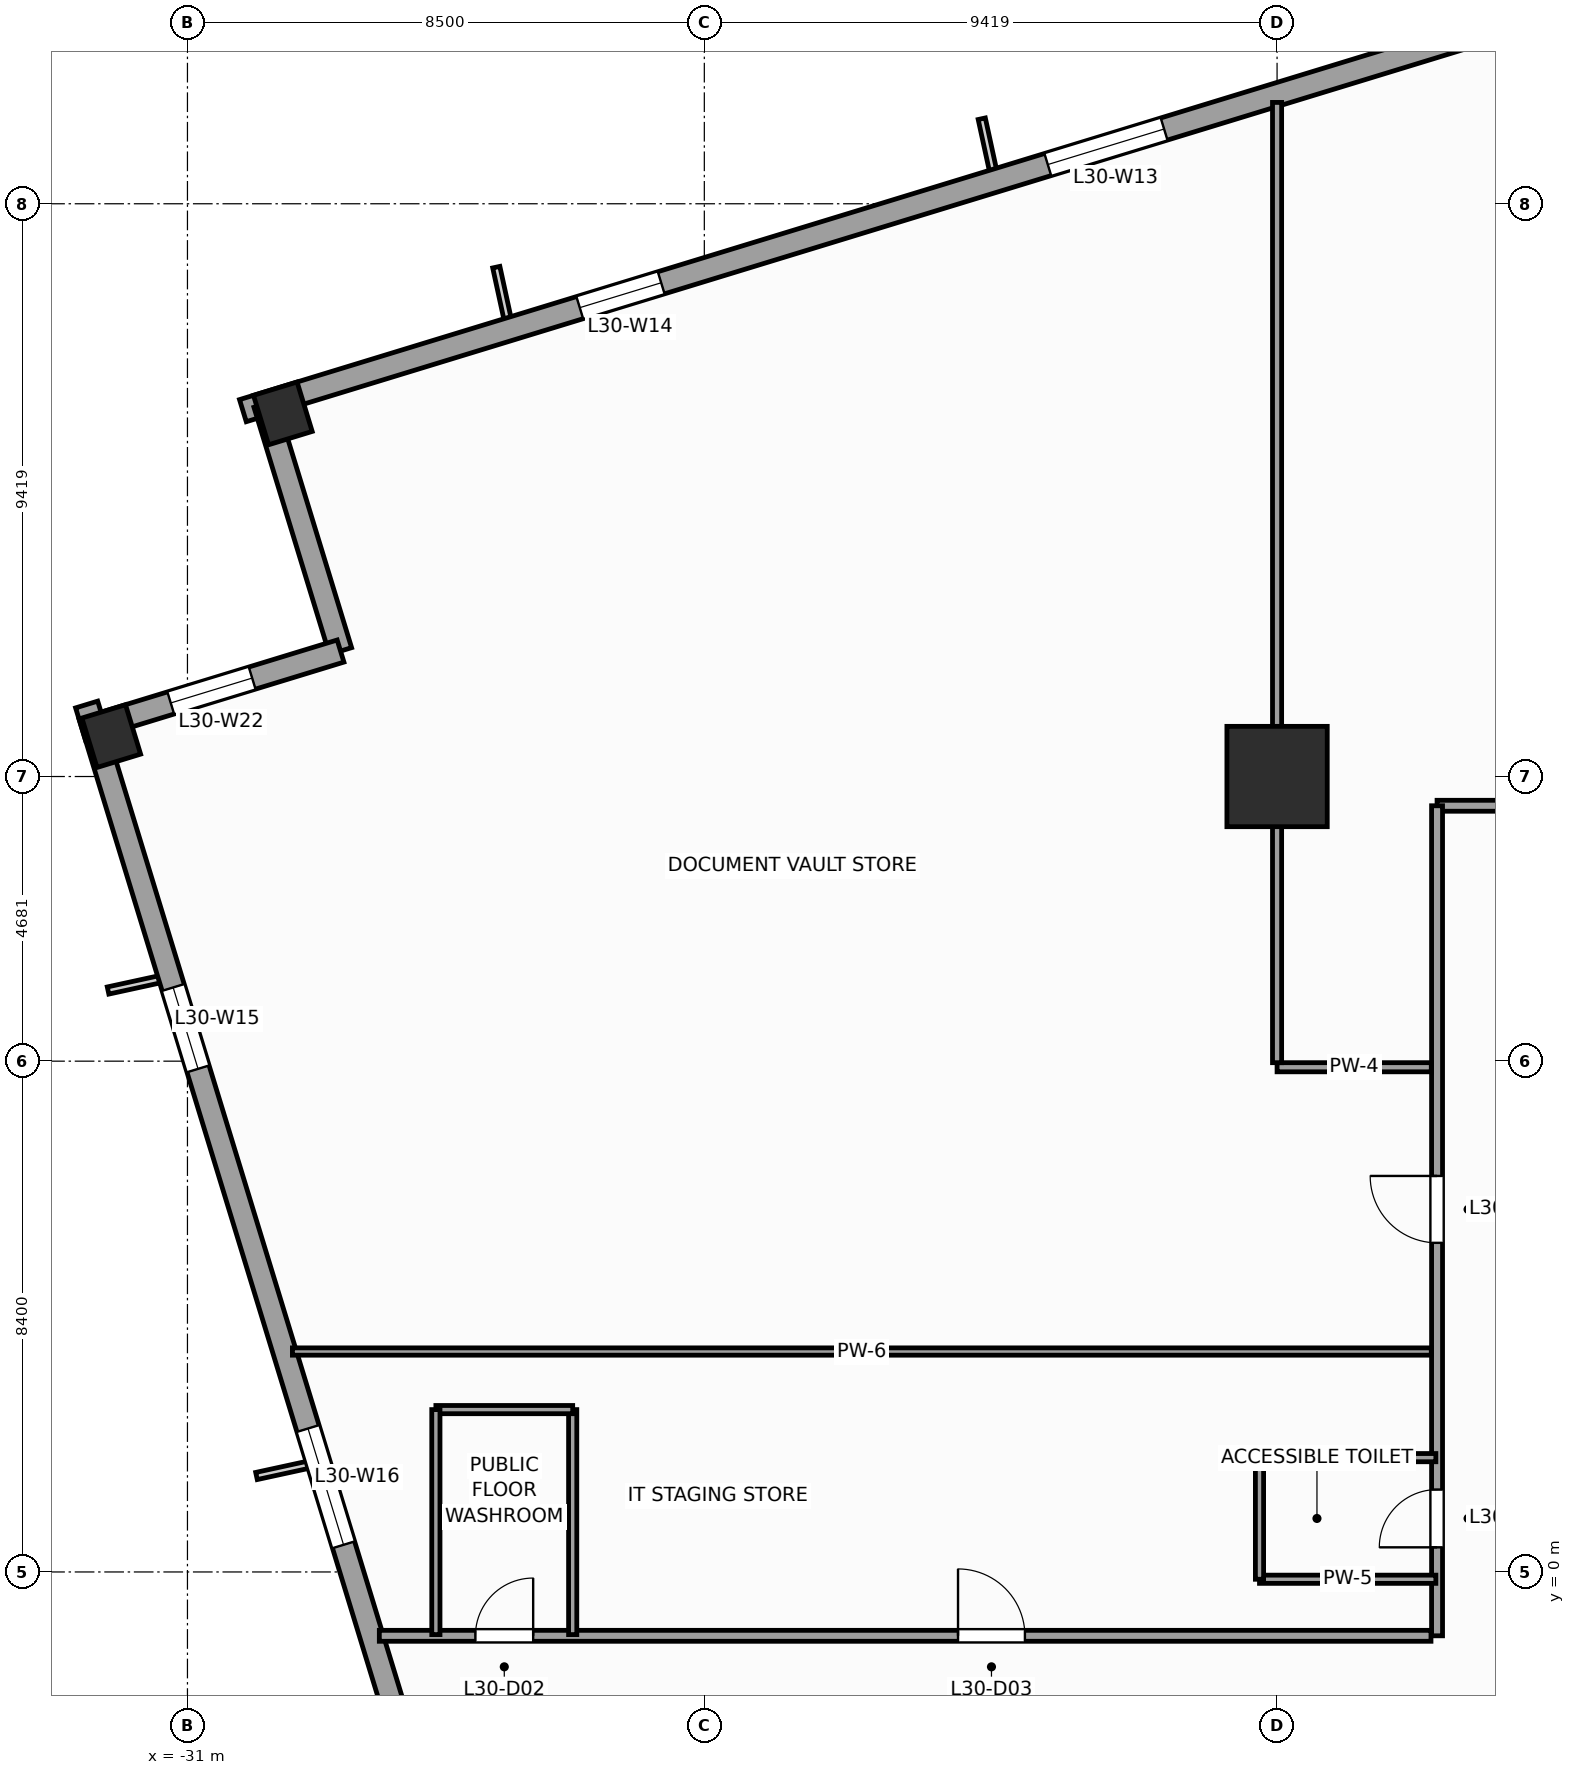
"""IFC4 building model, lengths in metres.
Left out: names, types, materials, properties, quantities, classifications, styles, units other than length and angle.
Written with IfcOpenShell. Run it as: python <this file> out.ifc"""

import sys

from ifc_helpers import new_model, si_unit, direction, frame, frame_2d, origin, origin_2d, place, context, subcontext, project, spatial, rectangle, extrude, source, transform, mapped, element, fill, save


model = new_model("IFC4")
c1 = context("Model", 3, precision=1e-05, world=origin(), true_north=direction((0.0, 1.0)))
c2 = subcontext(c1, "Body", "Model", "MODEL_VIEW")
j1 = project(units=[si_unit("LENGTHUNIT", "METRE"), si_unit("PLANEANGLEUNIT", "RADIAN")], contexts=[c1])
p1 = place(None, origin())
s1 = spatial("IfcSite", under=j1, at=p1, CompositionType="ELEMENT")
p2 = place(p1, origin())
s2 = spatial("IfcBuilding", under=s1, at=p2, CompositionType="ELEMENT")
p3 = place(p2, frame((0.0, 0.0, 127.2)))
s3 = spatial("IfcBuildingStorey", under=s2, at=p3, CompositionType="ELEMENT", Elevation=127.2)
m1 = source(origin(), c2, "Body", "SweptSolid", [
    extrude(rectangle(XDim=1.65, YDim=1.65, at=origin_2d()), origin(), (0.0, 0.0, 1.0), 4.0),
])
p4 = place(p3, frame((-13.081, 13.081, 0.0), z_axis=(0.0, 0.0, 1.0), x_axis=(1.0, 0.0, 0.0)))
e1 = element("IfcColumn", 1, at=p4, inside=s3, PredefinedType="COLUMN", context=c2, shape_type="MappedRepresentation", body=[
    mapped(m1, transform((0.0, 0.0, 0.0), scale=1.0)),
])
m2 = source(origin(), c2, "Body", "SweptSolid", [
    extrude(rectangle(XDim=0.75, YDim=0.85, at=origin_2d()), origin(), (0.0, 0.0, 1.0), 4.0),
])
for number, where, z_axis, x_axis in (
    (2, (-29.431, 19.052, 0.0), (0.0, 0.0, 1.0), (0.956, 0.292, 0.0)),
    (3, (-32.253, 13.746, 0.0), (0.0, 0.0, 1.0), (0.956, 0.292, 0.0)),
):
    element("IfcColumn", number, at=place(p3, frame(where, z_axis=z_axis, x_axis=x_axis)), inside=s3, PredefinedType="COLUMN", context=c2, shape_type="MappedRepresentation", body=[
        mapped(m2, transform((0.0, 0.0, 0.0), scale=1.0)),
    ])
p5 = place(p3, frame((14.265, 32.658, 0.0), z_axis=(0.0, 0.0, 1.0), x_axis=(-0.956304320851, -0.292373127906, 0.0)))
e4 = element("IfcWall", 4, at=p5, inside=s3, PredefinedType="STANDARD", context=c2, shape_type="SweptSolid", body=[
    extrude(rectangle(XDim=46.38, YDim=0.38, at=frame_2d((23.19, 0.0))), origin(), (0.0, 0.0, 1.0), 3.14),
])
p6 = place(p5, frame((17.065, 0.0, 0.0)))
e5 = element("IfcOpeningElement", 5, at=p6, cuts=e4, PredefinedType="OPENING", context=c2, shape_type="SweptSolid", body=[
    extrude(rectangle(XDim=1.05, YDim=2.25, at=frame_2d((0.525, 1.125))), frame((0.0, 0.2, 0.0), z_axis=(0.0, -1.0, 0.0), x_axis=(1.0, 0.0, 0.0)), (0.0, 0.0, 1.0), 0.4),
])
p7 = place(p5, frame((4.865, 0.0, 0.51)))
e6 = element("IfcOpeningElement", 6, at=p7, cuts=e4, PredefinedType="OPENING", context=c2, shape_type="SweptSolid", body=[
    extrude(rectangle(XDim=1.4, YDim=2.4, at=frame_2d((0.7, 1.2))), frame((0.0, 0.2, 0.0), z_axis=(0.0, -1.0, 0.0), x_axis=(1.0, 0.0, 0.0)), (0.0, 0.0, 1.0), 0.4),
])
p8 = place(p5, frame((12.45, 0.0, 0.51)))
e7 = element("IfcOpeningElement", 7, at=p8, cuts=e4, PredefinedType="OPENING", context=c2, shape_type="SweptSolid", body=[
    extrude(rectangle(XDim=2.0, YDim=2.4, at=frame_2d((1.0, 1.2))), frame((0.0, 0.2, 0.0), z_axis=(0.0, -1.0, 0.0), x_axis=(1.0, 0.0, 0.0)), (0.0, 0.0, 1.0), 0.4),
])
p9 = place(p5, frame((20.512, 0.0, 0.51)))
e8 = element("IfcOpeningElement", 8, at=p9, cuts=e4, PredefinedType="OPENING", context=c2, shape_type="SweptSolid", body=[
    extrude(rectangle(XDim=2.0, YDim=2.4, at=frame_2d((1.0, 1.2))), frame((0.0, 0.2, 0.0), z_axis=(0.0, -1.0, 0.0), x_axis=(1.0, 0.0, 0.0)), (0.0, 0.0, 1.0), 0.4),
])
p10 = place(p5, frame((30.538, 0.0, 0.51)))
e9 = element("IfcOpeningElement", 9, at=p10, cuts=e4, PredefinedType="OPENING", context=c2, shape_type="SweptSolid", body=[
    extrude(rectangle(XDim=2.0, YDim=2.4, at=frame_2d((1.0, 1.2))), frame((0.0, 0.2, 0.0), z_axis=(0.0, -1.0, 0.0), x_axis=(1.0, 0.0, 0.0)), (0.0, 0.0, 1.0), 0.4),
])
p11 = place(p5, frame((39.187, 0.0, 0.51)))
e10 = element("IfcOpeningElement", 10, at=p11, cuts=e4, PredefinedType="OPENING", context=c2, shape_type="SweptSolid", body=[
    extrude(rectangle(XDim=1.4, YDim=2.4, at=frame_2d((0.7, 1.2))), frame((0.0, 0.2, 0.0), z_axis=(0.0, -1.0, 0.0), x_axis=(1.0, 0.0, 0.0)), (0.0, 0.0, 1.0), 0.4),
])
p12 = place(p3, frame((-29.725, 19.208, 0.0), z_axis=(0.0, 0.0, 1.0), x_axis=(0.292345507338, -0.956312764915, 0.0)))
e11 = element("IfcWall", 11, at=p12, inside=s3, PredefinedType="STANDARD", context=c2, shape_type="SweptSolid", body=[
    extrude(rectangle(XDim=4.25, YDim=0.38, at=frame_2d((2.125, 0.0))), origin(), (0.0, 0.0, 1.0), 3.74),
])
p13 = place(p3, frame((-28.482, 15.144, 0.0), z_axis=(0.0, 0.0, 1.0), x_axis=(-0.956304176051, -0.292373601522, 0.0)))
e12 = element("IfcWall", 12, at=p13, inside=s3, PredefinedType="STANDARD", context=c2, shape_type="SweptSolid", body=[
    extrude(rectangle(XDim=4.44, YDim=0.38, at=frame_2d((2.22, 0.0))), origin(), (0.0, 0.0, 1.0), 3.04),
])
p14 = place(p13, frame((1.52, 0.0, 0.51)))
e13 = element("IfcOpeningElement", 13, at=p14, cuts=e12, PredefinedType="OPENING", context=c2, shape_type="SweptSolid", body=[
    extrude(rectangle(XDim=1.4, YDim=2.4, at=frame_2d((0.7, 1.2))), frame((0.0, 0.2, 0.0), z_axis=(0.0, -1.0, 0.0), x_axis=(1.0, 0.0, 0.0)), (0.0, 0.0, 1.0), 0.4),
])
p15 = place(p3, frame((-32.658, 14.265, 0.0), z_axis=(0.0, 0.0, 1.0), x_axis=(0.292373127906, -0.956304320851, 0.0)))
e14 = element("IfcWall", 14, at=p15, inside=s3, PredefinedType="STANDARD", context=c2, shape_type="SweptSolid", body=[
    extrude(rectangle(XDim=46.38, YDim=0.38, at=frame_2d((23.19, 0.0))), origin(), (0.0, 0.0, 1.0), 3.14),
])
p16 = place(p15, frame((4.865, 0.0, 0.51)))
e15 = element("IfcOpeningElement", 15, at=p16, cuts=e14, PredefinedType="OPENING", context=c2, shape_type="SweptSolid", body=[
    extrude(rectangle(XDim=1.4, YDim=2.4, at=frame_2d((0.7, 1.2))), frame((0.0, 0.2, 0.0), z_axis=(0.0, -1.0, 0.0), x_axis=(1.0, 0.0, 0.0)), (0.0, 0.0, 1.0), 0.4),
])
p17 = place(p15, frame((12.45, 0.0, 0.51)))
e16 = element("IfcOpeningElement", 16, at=p17, cuts=e14, PredefinedType="OPENING", context=c2, shape_type="SweptSolid", body=[
    extrude(rectangle(XDim=2.0, YDim=2.4, at=frame_2d((1.0, 1.2))), frame((0.0, 0.2, 0.0), z_axis=(0.0, -1.0, 0.0), x_axis=(1.0, 0.0, 0.0)), (0.0, 0.0, 1.0), 0.4),
])
p18 = place(p15, frame((20.512, 0.0, 0.51)))
e17 = element("IfcOpeningElement", 17, at=p18, cuts=e14, PredefinedType="OPENING", context=c2, shape_type="SweptSolid", body=[
    extrude(rectangle(XDim=2.0, YDim=2.4, at=frame_2d((1.0, 1.2))), frame((0.0, 0.2, 0.0), z_axis=(0.0, -1.0, 0.0), x_axis=(1.0, 0.0, 0.0)), (0.0, 0.0, 1.0), 0.4),
])
p19 = place(p15, frame((30.538, 0.0, 0.51)))
e18 = element("IfcOpeningElement", 18, at=p19, cuts=e14, PredefinedType="OPENING", context=c2, shape_type="SweptSolid", body=[
    extrude(rectangle(XDim=2.0, YDim=2.4, at=frame_2d((1.0, 1.2))), frame((0.0, 0.2, 0.0), z_axis=(0.0, -1.0, 0.0), x_axis=(1.0, 0.0, 0.0)), (0.0, 0.0, 1.0), 0.4),
])
p20 = place(p15, frame((39.187, 0.0, 0.51)))
e19 = element("IfcOpeningElement", 19, at=p20, cuts=e14, PredefinedType="OPENING", context=c2, shape_type="SweptSolid", body=[
    extrude(rectangle(XDim=1.4, YDim=2.4, at=frame_2d((0.7, 1.2))), frame((0.0, 0.2, 0.0), z_axis=(0.0, -1.0, 0.0), x_axis=(1.0, 0.0, 0.0)), (0.0, 0.0, 1.0), 0.4),
])
p21 = place(p3, frame((-10.45, 12.6, 0.0), z_axis=(0.0, 0.0, 1.0), x_axis=(1.0, 0.0, 0.0)))
e20 = element("IfcWall", 20, at=p21, inside=s3, PredefinedType="PARTITIONING", context=c2, shape_type="SweptSolid", body=[
    extrude(rectangle(XDim=22.0, YDim=0.18, at=frame_2d((11.0, 0.0))), origin(), (0.0, 0.0, 1.0), 3.74),
])
p22 = place(p21, frame((4.839, 0.0, 0.0)))
e21 = element("IfcOpeningElement", 21, at=p22, cuts=e20, PredefinedType="OPENING", context=c2, shape_type="SweptSolid", body=[
    extrude(rectangle(XDim=1.1, YDim=2.2, at=frame_2d((0.55, 1.1))), frame((0.0, 0.1, 0.0), z_axis=(0.0, -1.0, 0.0), x_axis=(1.0, 0.0, 0.0)), (0.0, 0.0, 1.0), 0.2),
])
p23 = place(p21, frame((13.1, 0.0, 0.0)))
e22 = element("IfcOpeningElement", 22, at=p23, cuts=e20, PredefinedType="OPENING", context=c2, shape_type="SweptSolid", body=[
    extrude(rectangle(XDim=1.1, YDim=2.2, at=frame_2d((0.55, 1.1))), frame((0.0, 0.1, 0.0), z_axis=(0.0, -1.0, 0.0), x_axis=(1.0, 0.0, 0.0)), (0.0, 0.0, 1.0), 0.2),
])
p24 = place(p21, frame((18.71, 0.0, 0.0)))
e23 = element("IfcOpeningElement", 23, at=p24, cuts=e20, PredefinedType="OPENING", context=c2, shape_type="SweptSolid", body=[
    extrude(rectangle(XDim=1.1, YDim=2.2, at=frame_2d((0.55, 1.1))), frame((0.0, 0.1, 0.0), z_axis=(0.0, -1.0, 0.0), x_axis=(1.0, 0.0, 0.0)), (0.0, 0.0, 1.0), 0.2),
])
p25 = place(p3, frame((-10.45, -1.05, 0.0), z_axis=(0.0, 0.0, 1.0), x_axis=(0.0, 1.0, 0.0)))
e24 = element("IfcWall", 24, at=p25, inside=s3, PredefinedType="PARTITIONING", context=c2, shape_type="SweptSolid", body=[
    extrude(rectangle(XDim=13.65, YDim=0.18, at=frame_2d((6.825, 0.0))), origin(), (0.0, 0.0, 1.0), 3.74),
])
p26 = place(p25, frame((1.455, 0.0, 0.0)))
e25 = element("IfcOpeningElement", 25, at=p26, cuts=e24, PredefinedType="OPENING", context=c2, shape_type="SweptSolid", body=[
    extrude(rectangle(XDim=0.95, YDim=2.1, at=frame_2d((0.475, 1.05))), frame((0.0, 0.1, 0.0), z_axis=(0.0, -1.0, 0.0), x_axis=(1.0, 0.0, 0.0)), (0.0, 0.0, 1.0), 0.2),
])
p27 = place(p25, frame((6.462, 0.0, 0.0)))
e26 = element("IfcOpeningElement", 26, at=p27, cuts=e24, PredefinedType="OPENING", context=c2, shape_type="SweptSolid", body=[
    extrude(rectangle(XDim=1.1, YDim=2.2, at=frame_2d((0.55, 1.1))), frame((0.0, 0.1, 0.0), z_axis=(0.0, -1.0, 0.0), x_axis=(1.0, 0.0, 0.0)), (0.0, 0.0, 1.0), 0.2),
])
p28 = place(p3, frame((-27.845, -1.05, 0.0), z_axis=(0.0, 0.0, 1.0), x_axis=(1.0, 0.0, 0.0)))
e27 = element("IfcWall", 27, at=p28, inside=s3, PredefinedType="PARTITIONING", context=c2, shape_type="SweptSolid", body=[
    extrude(rectangle(XDim=17.295, YDim=0.18, at=frame_2d((8.647, 0.0))), origin(), (0.0, 0.0, 1.0), 3.74),
])
p29 = place(p28, frame((1.58, 0.0, 0.0)))
e28 = element("IfcOpeningElement", 28, at=p29, cuts=e27, PredefinedType="OPENING", context=c2, shape_type="SweptSolid", body=[
    extrude(rectangle(XDim=0.95, YDim=2.1, at=frame_2d((0.475, 1.05))), frame((0.0, 0.1, 0.0), z_axis=(0.0, -1.0, 0.0), x_axis=(1.0, 0.0, 0.0)), (0.0, 0.0, 1.0), 0.2),
])
p30 = place(p28, frame((9.517, 0.0, 0.0)))
e29 = element("IfcOpeningElement", 29, at=p30, cuts=e27, PredefinedType="OPENING", context=c2, shape_type="SweptSolid", body=[
    extrude(rectangle(XDim=1.1, YDim=2.2, at=frame_2d((0.55, 1.1))), frame((0.0, 0.1, 0.0), z_axis=(0.0, -1.0, 0.0), x_axis=(1.0, 0.0, 0.0)), (0.0, 0.0, 1.0), 0.2),
])
p31 = place(p3, frame((-10.545, 8.3, 0.0), z_axis=(0.0, 0.0, 1.0), x_axis=(-1.0, 0.0, 0.0)))
e30 = element("IfcWall", 30, at=p31, inside=s3, PredefinedType="PARTITIONING", context=c2, shape_type="SweptSolid", body=[
    extrude(rectangle(XDim=2.536, YDim=0.15, at=frame_2d((1.268, 0.0))), origin(), (0.0, 0.0, 1.0), 3.74),
])
p32 = place(p3, frame((-13.081, 8.375, 0.0), z_axis=(0.0, 0.0, 1.0), x_axis=(0.0, 1.0, 0.0)))
e31 = element("IfcWall", 31, at=p32, inside=s3, PredefinedType="PARTITIONING", context=c2, shape_type="SweptSolid", body=[
    extrude(rectangle(XDim=15.792, YDim=0.15, at=frame_2d((7.896, 0.0))), origin(), (0.0, 0.0, 1.0), 2.732),
])
p33 = place(p3, frame((-29.274, 3.625, 0.0), z_axis=(0.0, 0.0, 1.0), x_axis=(1.0, 0.0, 0.0)))
e32 = element("IfcWall", 32, at=p33, inside=s3, PredefinedType="PARTITIONING", context=c2, shape_type="SweptSolid", body=[
    extrude(rectangle(XDim=18.729, YDim=0.12, at=frame_2d((9.365, 0.0))), origin(), (0.0, 0.0, 1.0), 3.74),
])
for number, where, z_axis, x_axis in (
    (33, (-13.37, -0.12, 0.0), (0.0, 0.0, 1.0), (1.0, 0.0, 0.0)),
    (34, (-13.37, 1.88, 0.0), (0.0, 0.0, 1.0), (1.0, 0.0, 0.0)),
):
    element("IfcWall", number, at=place(p3, frame(where, z_axis=z_axis, x_axis=x_axis)), inside=s3, PredefinedType="PARTITIONING", context=c2, shape_type="SweptSolid", body=[
        extrude(rectangle(XDim=2.9, YDim=0.135, at=frame_2d((1.45, 0.0))), origin(), (0.0, 0.0, 1.0), 3.74),
    ])
p34 = place(p3, frame((-13.37, -0.12, 0.0), z_axis=(0.0, 0.0, 1.0), x_axis=(0.0, 1.0, 0.0)))
e35 = element("IfcWall", 35, at=p34, inside=s3, PredefinedType="PARTITIONING", context=c2, shape_type="SweptSolid", body=[
    extrude(rectangle(XDim=2.0, YDim=0.135, at=frame_2d((1.0, 0.0))), origin(), (0.0, 0.0, 1.0), 2.732),
])
p35 = place(p3, frame((-24.665, -1.03, 0.0), z_axis=(0.0, 0.0, 1.0), x_axis=(0.0, 1.0, 0.0)))
e36 = element("IfcWall", 36, at=p35, inside=s3, PredefinedType="PARTITIONING", context=c2, shape_type="SweptSolid", body=[
    extrude(rectangle(XDim=3.7, YDim=0.135, at=frame_2d((1.85, 0.0))), origin(), (0.0, 0.0, 1.0), 3.74),
])
p36 = place(p3, frame((-26.915, 2.67, 0.0), z_axis=(0.0, 0.0, 1.0), x_axis=(1.0, 0.0, 0.0)))
e37 = element("IfcWall", 37, at=p36, inside=s3, PredefinedType="PARTITIONING", context=c2, shape_type="SweptSolid", body=[
    extrude(rectangle(XDim=2.25, YDim=0.135, at=frame_2d((1.125, 0.0))), origin(), (0.0, 0.0, 1.0), 3.74),
])
p37 = place(p3, frame((-26.915, -1.03, 0.0), z_axis=(0.0, 0.0, 1.0), x_axis=(0.0, 1.0, 0.0)))
e38 = element("IfcWall", 38, at=p37, inside=s3, PredefinedType="PARTITIONING", context=c2, shape_type="SweptSolid", body=[
    extrude(rectangle(XDim=3.7, YDim=0.135, at=frame_2d((1.85, 0.0))), origin(), (0.0, 0.0, 1.0), 3.74),
])
m3 = source(origin(), c2, "Body", "SweptSolid", [
    extrude(rectangle(XDim=2.0, YDim=2.4, at=frame_2d((1.0, 1.2))), frame((0.0, 0.03, 0.0), z_axis=(0.0, -1.0, 0.0), x_axis=(1.0, 0.0, 0.0)), (0.0, 0.0, 1.0), 0.06),
])
p38 = place(p10, origin())
e39 = element("IfcWindow", 39, at=p38, inside=s3, PartitioningType="SINGLE_PANEL", PredefinedType="WINDOW", context=c2, shape_type="MappedRepresentation", body=[
    mapped(m3, transform((0.0, 0.0, 0.0), scale=1.0)),
])
fill(e9, e39)
m4 = source(origin(), c2, "Body", "SweptSolid", [
    extrude(rectangle(XDim=1.4, YDim=2.4, at=frame_2d((0.7, 1.2))), frame((0.0, 0.03, 0.0), z_axis=(0.0, -1.0, 0.0), x_axis=(1.0, 0.0, 0.0)), (0.0, 0.0, 1.0), 0.06),
])
p39 = place(p11, origin())
e40 = element("IfcWindow", 40, at=p39, inside=s3, PartitioningType="SINGLE_PANEL", PredefinedType="WINDOW", context=c2, shape_type="MappedRepresentation", body=[
    mapped(m4, transform((0.0, 0.0, 0.0), scale=1.0)),
])
fill(e10, e40)
p40 = place(p16, origin())
e41 = element("IfcWindow", 41, at=p40, inside=s3, PartitioningType="SINGLE_PANEL", PredefinedType="WINDOW", context=c2, shape_type="MappedRepresentation", body=[
    mapped(m4, transform((0.0, 0.0, 0.0), scale=1.0)),
])
fill(e15, e41)
p41 = place(p17, origin())
e42 = element("IfcWindow", 42, at=p41, inside=s3, PartitioningType="SINGLE_PANEL", PredefinedType="WINDOW", context=c2, shape_type="MappedRepresentation", body=[
    mapped(m3, transform((0.0, 0.0, 0.0), scale=1.0)),
])
fill(e16, e42)
p42 = place(p14, origin())
e43 = element("IfcWindow", 43, at=p42, inside=s3, PartitioningType="SINGLE_PANEL", PredefinedType="WINDOW", context=c2, shape_type="MappedRepresentation", body=[
    mapped(m4, transform((0.0, 0.0, 0.0), scale=1.0)),
])
fill(e13, e43)
m5 = source(origin(), c2, "Body", "SweptSolid", [
    extrude(rectangle(XDim=0.95, YDim=2.1, at=frame_2d((0.475, 1.05))), frame((0.0, 0.025, 0.0), z_axis=(0.0, -1.0, 0.0), x_axis=(1.0, 0.0, 0.0)), (0.0, 0.0, 1.0), 0.05),
])
p43 = place(p26, origin())
e44 = element("IfcDoor", 44, at=p43, inside=s3, OperationType="SINGLE_SWING_LEFT", PredefinedType="DOOR", context=c2, shape_type="MappedRepresentation", body=[
    mapped(m5, transform((0.0, 0.0, 0.0), scale=1.0)),
])
fill(e25, e44)
p44 = place(p29, origin())
e45 = element("IfcDoor", 45, at=p44, inside=s3, OperationType="SINGLE_SWING_RIGHT", PredefinedType="DOOR", context=c2, shape_type="MappedRepresentation", body=[
    mapped(m5, transform((0.0, 0.0, 0.0), scale=1.0)),
])
fill(e28, e45)
m6 = source(origin(), c2, "Body", "SweptSolid", [
    extrude(rectangle(XDim=1.1, YDim=2.2, at=frame_2d((0.55, 1.1))), frame((0.0, 0.025, 0.0), z_axis=(0.0, -1.0, 0.0), x_axis=(1.0, 0.0, 0.0)), (0.0, 0.0, 1.0), 0.05),
])
p45 = place(p30, origin())
e46 = element("IfcDoor", 46, at=p45, inside=s3, OperationType="SINGLE_SWING_LEFT", PredefinedType="DOOR", context=c2, shape_type="MappedRepresentation", body=[
    mapped(m6, transform((0.0, 0.0, 0.0), scale=1.0)),
])
fill(e29, e46)
p46 = place(p27, origin())
e47 = element("IfcDoor", 47, at=p46, inside=s3, OperationType="SINGLE_SWING_RIGHT", PredefinedType="DOOR", context=c2, shape_type="MappedRepresentation", body=[
    mapped(m6, transform((0.0, 0.0, 0.0), scale=1.0)),
])
fill(e26, e47)
save(model, sys.argv[1])
